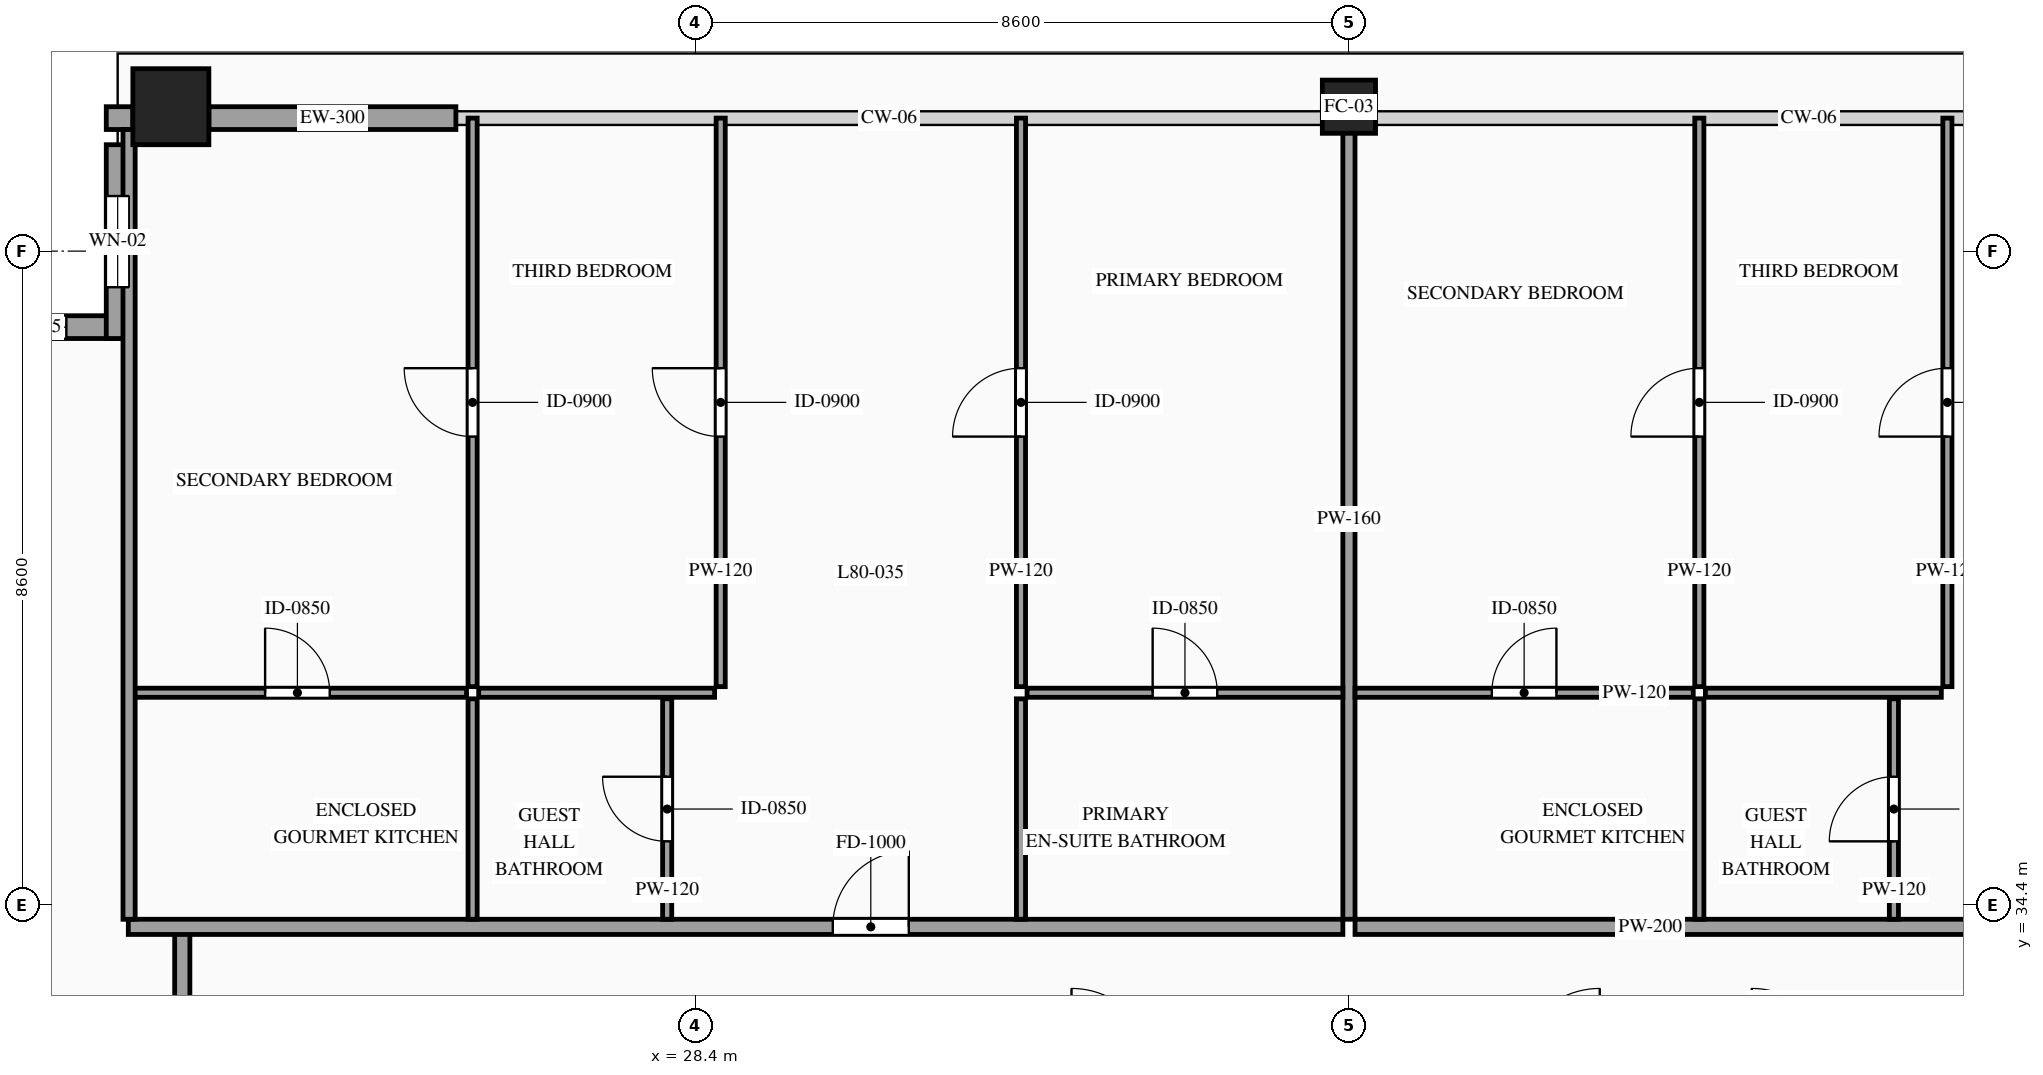
"""IFC4 building model, lengths in metres.
Left out: names, types, materials, properties, quantities, classifications, styles, units other than length and angle.
Written with IfcOpenShell. Run it as: python <this file> out.ifc"""

import sys

from ifc_helpers import new_model, si_unit, direction, frame, frame_2d, origin, origin_2d, place, context, subcontext, project, spatial, rectangle, hollow_rectangle, extrude, source, transform, mapped, element, fill, save


model = new_model("IFC4")
c1 = context("Model", 3, precision=1e-05, world=origin(), true_north=direction((0.0, 1.0)))
c2 = subcontext(c1, "Body", "Model", "MODEL_VIEW")
j1 = project(units=[si_unit("LENGTHUNIT", "METRE"), si_unit("PLANEANGLEUNIT", "RADIAN")], contexts=[c1])
p1 = place(None, origin())
s1 = spatial("IfcSite", under=j1, at=p1, CompositionType="ELEMENT")
p2 = place(p1, origin())
s2 = spatial("IfcBuilding", under=s1, at=p2, CompositionType="ELEMENT")
p3 = place(p2, frame((0.0, 0.0, 299.6)))
s3 = spatial("IfcBuildingStorey", under=s2, at=p3, CompositionType="ELEMENT", Elevation=299.6)
m1 = source(origin(), c2, "Body", "SweptSolid", [
    extrude(hollow_rectangle(XDim=1.0, YDim=1.0, WallThickness=0.048, at=origin_2d()), origin(), (0.0, 0.0, 1.0), 3.5),
])
p4 = place(p3, frame((21.5, 44.9, 0.0), z_axis=(0.0, 0.0, 1.0), x_axis=(1.0, 0.0, 0.0)))
e1 = element("IfcColumn", 1, at=p4, inside=s3, PredefinedType="COLUMN", context=c2, shape_type="MappedRepresentation", body=[
    mapped(m1, transform((0.0, 0.0, 0.0), scale=1.0)),
])
m2 = source(origin(), c2, "Body", "SweptSolid", [
    extrude(hollow_rectangle(XDim=0.7, YDim=0.7, WallThickness=0.032, at=origin_2d()), origin(), (0.0, 0.0, 1.0), 3.5),
])
p5 = place(p3, frame((37.0, 44.9, 0.0), z_axis=(0.0, 0.0, 1.0), x_axis=(1.0, 0.0, 0.0)))
e2 = element("IfcColumn", 2, at=p5, inside=s3, PredefinedType="COLUMN", context=c2, shape_type="MappedRepresentation", body=[
    mapped(m2, transform((0.0, 0.0, 0.0), scale=1.0)),
])
p6 = place(p3, frame((20.95, 42.0, 0.0), z_axis=(0.0, 0.0, 1.0), x_axis=(-1.0, 0.0, 0.0)))
e3 = element("IfcWall", 3, at=p6, inside=s3, PredefinedType="SOLIDWALL", context=c2, shape_type="SweptSolid", body=[
    extrude(rectangle(XDim=2.55, YDim=0.3, at=frame_2d((1.275, 0.0))), origin(), (0.0, 0.0, 1.0), 3.28),
])
p7 = place(p6, frame((0.825, 0.0, 0.85)))
e4 = element("IfcOpeningElement", 4, at=p7, cuts=e3, PredefinedType="OPENING", context=c2, shape_type="SweptSolid", body=[
    extrude(rectangle(XDim=0.9, YDim=1.5, at=frame_2d((0.45, 0.75))), frame((0.0, 0.165, 0.0), z_axis=(0.0, -1.0, 0.0), x_axis=(1.0, 0.0, 0.0)), (0.0, 0.0, 1.0), 0.33),
])
p8 = place(p3, frame((20.8, 44.4, 0.0), z_axis=(0.0, 0.0, 1.0), x_axis=(0.0, -1.0, 0.0)))
e5 = element("IfcWall", 5, at=p8, inside=s3, PredefinedType="SOLIDWALL", context=c2, shape_type="SweptSolid", body=[
    extrude(rectangle(XDim=2.55, YDim=0.3, at=frame_2d((1.275, 0.0))), origin(), (0.0, 0.0, 1.0), 3.28),
])
p9 = place(p8, frame((0.675, 0.0, 0.85)))
e6 = element("IfcOpeningElement", 6, at=p9, cuts=e5, PredefinedType="OPENING", context=c2, shape_type="SweptSolid", body=[
    extrude(rectangle(XDim=1.2, YDim=2.1, at=frame_2d((0.6, 1.05))), frame((0.0, 0.165, 0.0), z_axis=(0.0, -1.0, 0.0), x_axis=(1.0, 0.0, 0.0)), (0.0, 0.0, 1.0), 0.33),
])
m3 = source(origin(), c2, "Body", "SweptSolid", [
    extrude(rectangle(XDim=0.35, YDim=0.3, at=frame_2d((0.175, 0.0))), origin(), (0.0, 0.0, 1.0), 3.28),
])
p10 = place(p3, frame((20.65, 44.75, 0.0), z_axis=(0.0, 0.0, 1.0), x_axis=(1.0, 0.0, 0.0)))
e7 = element("IfcWall", 7, at=p10, inside=s3, PredefinedType="SOLIDWALL", context=c2, shape_type="MappedRepresentation", body=[
    mapped(m3, transform((0.0, 0.0, 0.0), scale=1.0)),
])
m4 = source(origin(), c2, "Body", "SweptSolid", [
    extrude(rectangle(XDim=3.25, YDim=0.3, at=frame_2d((1.625, 0.0))), origin(), (0.0, 0.0, 1.0), 2.885),
])
p11 = place(p3, frame((22.0, 44.75, 0.0), z_axis=(0.0, 0.0, 1.0), x_axis=(1.0, 0.0, 0.0)))
e8 = element("IfcWall", 8, at=p11, inside=s3, PredefinedType="SOLIDWALL", context=c2, shape_type="MappedRepresentation", body=[
    mapped(m4, transform((0.0, 0.0, 0.0), scale=1.0)),
])
m5 = source(origin(), c2, "Body", "SweptSolid", [
    extrude(rectangle(XDim=1.7, YDim=0.2, at=frame_2d((0.85, 0.0))), origin(), (0.0, 0.0, 1.0), 3.28),
])
p12 = place(p3, frame((21.65, 32.35, 0.0), z_axis=(0.0, 0.0, 1.0), x_axis=(0.0, 1.0, 0.0)))
e9 = element("IfcWall", 9, at=p12, inside=s3, PredefinedType="PARTITIONING", context=c2, shape_type="MappedRepresentation", body=[
    mapped(m5, transform((0.0, 0.0, 0.0), scale=1.0)),
])
p13 = place(p3, frame((20.94, 34.11, 0.0), z_axis=(0.0, 0.0, 1.0), x_axis=(1.0, 0.0, 0.0)))
e10 = element("IfcWall", 10, at=p13, inside=s3, PredefinedType="PARTITIONING", context=c2, shape_type="SweptSolid", body=[
    extrude(rectangle(XDim=15.98, YDim=0.2, at=frame_2d((7.99, 0.0))), origin(), (0.0, 0.0, 1.0), 3.28),
])
p14 = place(p13, frame((9.269, 0.0, 0.0)))
e11 = element("IfcOpeningElement", 11, at=p14, cuts=e10, PredefinedType="OPENING", context=c2, shape_type="SweptSolid", body=[
    extrude(rectangle(XDim=1.0, YDim=2.2, at=frame_2d((0.5, 1.1))), frame((0.0, 0.115, 0.0), z_axis=(0.0, -1.0, 0.0), x_axis=(1.0, 0.0, 0.0)), (0.0, 0.0, 1.0), 0.23),
])
m6 = source(origin(), c2, "Body", "SweptSolid", [
    extrude(rectangle(XDim=10.54, YDim=0.16, at=frame_2d((5.27, 0.0))), origin(), (0.0, 0.0, 1.0), 2.787),
])
p15 = place(p3, frame((37.0, 34.21, 0.0), z_axis=(0.0, 0.0, 1.0), x_axis=(0.0, 1.0, 0.0)))
e12 = element("IfcWall", 12, at=p15, inside=s3, PredefinedType="PARTITIONING", context=c2, shape_type="MappedRepresentation", body=[
    mapped(m6, transform((0.0, 0.0, 0.0), scale=1.0)),
])
p16 = place(p3, frame((20.94, 37.19, 0.0), z_axis=(0.0, 0.0, 1.0), x_axis=(1.0, 0.0, 0.0)))
e13 = element("IfcWall", 13, at=p16, inside=s3, PredefinedType="PARTITIONING", context=c2, shape_type="SweptSolid", body=[
    extrude(rectangle(XDim=4.45, YDim=0.12, at=frame_2d((2.225, 0.0))), origin(), (0.0, 0.0, 1.0), 3.28),
])
p17 = place(p16, frame((1.8, 0.0, 0.0)))
e14 = element("IfcOpeningElement", 14, at=p17, cuts=e13, PredefinedType="OPENING", context=c2, shape_type="SweptSolid", body=[
    extrude(rectangle(XDim=0.85, YDim=2.1, at=frame_2d((0.425, 1.05))), frame((0.0, 0.075, 0.0), z_axis=(0.0, -1.0, 0.0), x_axis=(1.0, 0.0, 0.0)), (0.0, 0.0, 1.0), 0.15),
])
m7 = source(origin(), c2, "Body", "SweptSolid", [
    extrude(rectangle(XDim=2.9, YDim=0.12, at=frame_2d((1.45, 0.0))), origin(), (0.0, 0.0, 1.0), 3.28),
])
p18 = place(p3, frame((25.47, 34.21, 0.0), z_axis=(0.0, 0.0, 1.0), x_axis=(0.0, 1.0, 0.0)))
e15 = element("IfcWall", 15, at=p18, inside=s3, PredefinedType="PARTITIONING", context=c2, shape_type="MappedRepresentation", body=[
    mapped(m7, transform((0.0, 0.0, 0.0), scale=1.0)),
])
p19 = place(p3, frame((28.03, 34.21, 0.0), z_axis=(0.0, 0.0, 1.0), x_axis=(0.0, 1.0, 0.0)))
e16 = element("IfcWall", 16, at=p19, inside=s3, PredefinedType="PARTITIONING", context=c2, shape_type="SweptSolid", body=[
    extrude(rectangle(XDim=2.9, YDim=0.12, at=frame_2d((1.45, 0.0))), origin(), (0.0, 0.0, 1.0), 3.28),
])
p20 = place(p19, frame((1.025, 0.0, 0.0)))
e17 = element("IfcOpeningElement", 17, at=p20, cuts=e16, PredefinedType="OPENING", context=c2, shape_type="SweptSolid", body=[
    extrude(rectangle(XDim=0.85, YDim=2.1, at=frame_2d((0.425, 1.05))), frame((0.0, 0.075, 0.0), z_axis=(0.0, -1.0, 0.0), x_axis=(1.0, 0.0, 0.0)), (0.0, 0.0, 1.0), 0.15),
])
p21 = place(p3, frame((32.765, 37.19, 0.0), z_axis=(0.0, 0.0, 1.0), x_axis=(1.0, 0.0, 0.0)))
e18 = element("IfcWall", 18, at=p21, inside=s3, PredefinedType="PARTITIONING", context=c2, shape_type="SweptSolid", body=[
    extrude(rectangle(XDim=4.155, YDim=0.12, at=frame_2d((2.078, 0.0))), origin(), (0.0, 0.0, 1.0), 3.28),
])
p22 = place(p21, frame((1.653, 0.0, 0.0)))
e19 = element("IfcOpeningElement", 19, at=p22, cuts=e18, PredefinedType="OPENING", context=c2, shape_type="SweptSolid", body=[
    extrude(rectangle(XDim=0.85, YDim=2.1, at=frame_2d((0.425, 1.05))), frame((0.0, 0.075, 0.0), z_axis=(0.0, -1.0, 0.0), x_axis=(1.0, 0.0, 0.0)), (0.0, 0.0, 1.0), 0.15),
])
p23 = place(p3, frame((32.685, 34.21, 0.0), z_axis=(0.0, 0.0, 1.0), x_axis=(0.0, 1.0, 0.0)))
e20 = element("IfcWall", 20, at=p23, inside=s3, PredefinedType="PARTITIONING", context=c2, shape_type="MappedRepresentation", body=[
    mapped(m7, transform((0.0, 0.0, 0.0), scale=1.0)),
])
p24 = place(p3, frame((25.47, 37.27, 0.0), z_axis=(0.0, 0.0, 1.0), x_axis=(0.0, 1.0, 0.0)))
e21 = element("IfcWall", 21, at=p24, inside=s3, PredefinedType="PARTITIONING", context=c2, shape_type="SweptSolid", body=[
    extrude(rectangle(XDim=7.48, YDim=0.12, at=frame_2d((3.74, 0.0))), origin(), (0.0, 0.0, 1.0), 3.28),
])
p25 = place(p24, frame((3.29, 0.0, 0.0)))
e22 = element("IfcOpeningElement", 22, at=p25, cuts=e21, PredefinedType="OPENING", context=c2, shape_type="SweptSolid", body=[
    extrude(rectangle(XDim=0.9, YDim=2.15, at=frame_2d((0.45, 1.075))), frame((0.0, 0.075, 0.0), z_axis=(0.0, -1.0, 0.0), x_axis=(1.0, 0.0, 0.0)), (0.0, 0.0, 1.0), 0.15),
])
p26 = place(p3, frame((32.685, 37.27, 0.0), z_axis=(0.0, 0.0, 1.0), x_axis=(0.0, 1.0, 0.0)))
e23 = element("IfcWall", 23, at=p26, inside=s3, PredefinedType="PARTITIONING", context=c2, shape_type="SweptSolid", body=[
    extrude(rectangle(XDim=7.48, YDim=0.12, at=frame_2d((3.74, 0.0))), origin(), (0.0, 0.0, 1.0), 3.28),
])
p27 = place(p26, frame((3.29, 0.0, 0.0)))
e24 = element("IfcOpeningElement", 24, at=p27, cuts=e23, PredefinedType="OPENING", context=c2, shape_type="SweptSolid", body=[
    extrude(rectangle(XDim=0.9, YDim=2.15, at=frame_2d((0.45, 1.075))), frame((0.0, 0.075, 0.0), z_axis=(0.0, -1.0, 0.0), x_axis=(1.0, 0.0, 0.0)), (0.0, 0.0, 1.0), 0.15),
])
m8 = source(origin(), c2, "Body", "SweptSolid", [
    extrude(rectangle(XDim=3.104, YDim=0.12, at=frame_2d((1.552, 0.0))), origin(), (0.0, 0.0, 1.0), 3.28),
])
p28 = place(p3, frame((25.55, 37.19, 0.0), z_axis=(0.0, 0.0, 1.0), x_axis=(1.0, 0.0, 0.0)))
e25 = element("IfcWall", 25, at=p28, inside=s3, PredefinedType="PARTITIONING", context=c2, shape_type="MappedRepresentation", body=[
    mapped(m8, transform((0.0, 0.0, 0.0), scale=1.0)),
])
p29 = place(p3, frame((28.734, 37.27, 0.0), z_axis=(0.0, 0.0, 1.0), x_axis=(0.0, 1.0, 0.0)))
e26 = element("IfcWall", 26, at=p29, inside=s3, PredefinedType="PARTITIONING", context=c2, shape_type="SweptSolid", body=[
    extrude(rectangle(XDim=7.48, YDim=0.12, at=frame_2d((3.74, 0.0))), origin(), (0.0, 0.0, 1.0), 3.28),
])
p30 = place(p29, frame((3.29, 0.0, 0.0)))
e27 = element("IfcOpeningElement", 27, at=p30, cuts=e26, PredefinedType="OPENING", context=c2, shape_type="SweptSolid", body=[
    extrude(rectangle(XDim=0.9, YDim=2.15, at=frame_2d((0.45, 1.075))), frame((0.0, 0.075, 0.0), z_axis=(0.0, -1.0, 0.0), x_axis=(1.0, 0.0, 0.0)), (0.0, 0.0, 1.0), 0.15),
])
p31 = place(p3, frame((37.08, 34.11, 0.0), z_axis=(0.0, 0.0, 1.0), x_axis=(1.0, 0.0, 0.0)))
e28 = element("IfcWall", 28, at=p31, inside=s3, PredefinedType="PARTITIONING", context=c2, shape_type="SweptSolid", body=[
    extrude(rectangle(XDim=15.98, YDim=0.2, at=frame_2d((7.99, 0.0))), origin(), (0.0, 0.0, 1.0), 3.28),
])
p32 = place(p31, frame((8.022, 0.0, 0.0)))
e29 = element("IfcOpeningElement", 29, at=p32, cuts=e28, PredefinedType="OPENING", context=c2, shape_type="SweptSolid", body=[
    extrude(rectangle(XDim=1.0, YDim=2.2, at=frame_2d((0.5, 1.1))), frame((0.0, 0.115, 0.0), z_axis=(0.0, -1.0, 0.0), x_axis=(1.0, 0.0, 0.0)), (0.0, 0.0, 1.0), 0.23),
])
m9 = source(origin(), c2, "Body", "SweptSolid", [
    extrude(rectangle(XDim=10.39, YDim=0.16, at=frame_2d((5.195, 0.0))), origin(), (0.0, 0.0, 1.0), 3.28),
])
p33 = place(p3, frame((20.95, 34.21, 0.0), z_axis=(0.0, 0.0, 1.0), x_axis=(0.0, 1.0, 0.0)))
e30 = element("IfcWall", 30, at=p33, inside=s3, PredefinedType="PARTITIONING", context=c2, shape_type="MappedRepresentation", body=[
    mapped(m9, transform((0.0, 0.0, 0.0), scale=1.0)),
])
p34 = place(p3, frame((37.08, 37.19, 0.0), z_axis=(0.0, 0.0, 1.0), x_axis=(1.0, 0.0, 0.0)))
e31 = element("IfcWall", 31, at=p34, inside=s3, PredefinedType="PARTITIONING", context=c2, shape_type="SweptSolid", body=[
    extrude(rectangle(XDim=4.45, YDim=0.12, at=frame_2d((2.225, 0.0))), origin(), (0.0, 0.0, 1.0), 3.28),
])
p35 = place(p34, frame((1.8, 0.0, 0.0)))
e32 = element("IfcOpeningElement", 32, at=p35, cuts=e31, PredefinedType="OPENING", context=c2, shape_type="SweptSolid", body=[
    extrude(rectangle(XDim=0.85, YDim=2.1, at=frame_2d((0.425, 1.05))), frame((0.0, 0.075, 0.0), z_axis=(0.0, -1.0, 0.0), x_axis=(1.0, 0.0, 0.0)), (0.0, 0.0, 1.0), 0.15),
])
p36 = place(p3, frame((41.61, 34.21, 0.0), z_axis=(0.0, 0.0, 1.0), x_axis=(0.0, 1.0, 0.0)))
e33 = element("IfcWall", 33, at=p36, inside=s3, PredefinedType="PARTITIONING", context=c2, shape_type="MappedRepresentation", body=[
    mapped(m7, transform((0.0, 0.0, 0.0), scale=1.0)),
])
p37 = place(p3, frame((44.17, 34.21, 0.0), z_axis=(0.0, 0.0, 1.0), x_axis=(0.0, 1.0, 0.0)))
e34 = element("IfcWall", 34, at=p37, inside=s3, PredefinedType="PARTITIONING", context=c2, shape_type="SweptSolid", body=[
    extrude(rectangle(XDim=2.9, YDim=0.12, at=frame_2d((1.45, 0.0))), origin(), (0.0, 0.0, 1.0), 3.28),
])
p38 = place(p37, frame((1.025, 0.0, 0.0)))
e35 = element("IfcOpeningElement", 35, at=p38, cuts=e34, PredefinedType="OPENING", context=c2, shape_type="SweptSolid", body=[
    extrude(rectangle(XDim=0.85, YDim=2.1, at=frame_2d((0.425, 1.05))), frame((0.0, 0.075, 0.0), z_axis=(0.0, -1.0, 0.0), x_axis=(1.0, 0.0, 0.0)), (0.0, 0.0, 1.0), 0.15),
])
p39 = place(p3, frame((41.61, 37.27, 0.0), z_axis=(0.0, 0.0, 1.0), x_axis=(0.0, 1.0, 0.0)))
e36 = element("IfcWall", 36, at=p39, inside=s3, PredefinedType="PARTITIONING", context=c2, shape_type="SweptSolid", body=[
    extrude(rectangle(XDim=7.48, YDim=0.12, at=frame_2d((3.74, 0.0))), origin(), (0.0, 0.0, 1.0), 3.28),
])
p40 = place(p39, frame((3.29, 0.0, 0.0)))
e37 = element("IfcOpeningElement", 37, at=p40, cuts=e36, PredefinedType="OPENING", context=c2, shape_type="SweptSolid", body=[
    extrude(rectangle(XDim=0.9, YDim=2.15, at=frame_2d((0.45, 1.075))), frame((0.0, 0.075, 0.0), z_axis=(0.0, -1.0, 0.0), x_axis=(1.0, 0.0, 0.0)), (0.0, 0.0, 1.0), 0.15),
])
p41 = place(p3, frame((41.69, 37.19, 0.0), z_axis=(0.0, 0.0, 1.0), x_axis=(1.0, 0.0, 0.0)))
e38 = element("IfcWall", 38, at=p41, inside=s3, PredefinedType="PARTITIONING", context=c2, shape_type="MappedRepresentation", body=[
    mapped(m8, transform((0.0, 0.0, 0.0), scale=1.0)),
])
p42 = place(p3, frame((44.874, 37.27, 0.0), z_axis=(0.0, 0.0, 1.0), x_axis=(0.0, 1.0, 0.0)))
e39 = element("IfcWall", 39, at=p42, inside=s3, PredefinedType="PARTITIONING", context=c2, shape_type="SweptSolid", body=[
    extrude(rectangle(XDim=7.48, YDim=0.12, at=frame_2d((3.74, 0.0))), origin(), (0.0, 0.0, 1.0), 3.28),
])
p43 = place(p42, frame((3.29, 0.0, 0.0)))
e40 = element("IfcOpeningElement", 40, at=p43, cuts=e39, PredefinedType="OPENING", context=c2, shape_type="SweptSolid", body=[
    extrude(rectangle(XDim=0.9, YDim=2.15, at=frame_2d((0.45, 1.075))), frame((0.0, 0.075, 0.0), z_axis=(0.0, -1.0, 0.0), x_axis=(1.0, 0.0, 0.0)), (0.0, 0.0, 1.0), 0.15),
])
m10 = source(origin(), c2, "Body", "SweptSolid", [
    extrude(rectangle(XDim=0.9, YDim=1.5, at=frame_2d((0.45, 0.75))), frame((0.0, 0.03, 0.0), z_axis=(0.0, -1.0, 0.0), x_axis=(1.0, 0.0, 0.0)), (0.0, 0.0, 1.0), 0.06),
])
p44 = place(p7, origin())
e41 = element("IfcWindow", 41, at=p44, inside=s3, PartitioningType="SINGLE_PANEL", PredefinedType="WINDOW", context=c2, shape_type="MappedRepresentation", body=[
    mapped(m10, transform((0.0, 0.0, 0.0), scale=1.0)),
])
fill(e4, e41)
m11 = source(origin(), c2, "Body", "SweptSolid", [
    extrude(rectangle(XDim=1.2, YDim=2.1, at=frame_2d((0.6, 1.05))), frame((0.0, 0.03, 0.0), z_axis=(0.0, -1.0, 0.0), x_axis=(1.0, 0.0, 0.0)), (0.0, 0.0, 1.0), 0.06),
])
p45 = place(p9, origin())
e42 = element("IfcWindow", 42, at=p45, inside=s3, PartitioningType="SINGLE_PANEL", PredefinedType="WINDOW", context=c2, shape_type="MappedRepresentation", body=[
    mapped(m11, transform((0.0, 0.0, 0.0), scale=1.0)),
])
fill(e6, e42)
m12 = source(origin(), c2, "Body", "SweptSolid", [
    extrude(rectangle(XDim=1.0, YDim=2.2, at=frame_2d((0.5, 1.1))), frame((0.0, 0.025, 0.0), z_axis=(0.0, -1.0, 0.0), x_axis=(1.0, 0.0, 0.0)), (0.0, 0.0, 1.0), 0.05),
])
p46 = place(p14, origin())
e43 = element("IfcDoor", 43, at=p46, inside=s3, OperationType="SINGLE_SWING_RIGHT", PredefinedType="DOOR", context=c2, shape_type="MappedRepresentation", body=[
    mapped(m12, transform((0.0, 0.0, 0.0), scale=1.0)),
])
fill(e11, e43)
m13 = source(origin(), c2, "Body", "SweptSolid", [
    extrude(rectangle(XDim=0.85, YDim=2.1, at=frame_2d((0.425, 1.05))), frame((0.0, 0.025, 0.0), z_axis=(0.0, -1.0, 0.0), x_axis=(1.0, 0.0, 0.0)), (0.0, 0.0, 1.0), 0.05),
])
p47 = place(p17, origin())
e44 = element("IfcDoor", 44, at=p47, inside=s3, OperationType="SINGLE_SWING_LEFT", PredefinedType="DOOR", context=c2, shape_type="MappedRepresentation", body=[
    mapped(m13, transform((0.0, 0.0, 0.0), scale=1.0)),
])
fill(e14, e44)
p48 = place(p20, origin())
e45 = element("IfcDoor", 45, at=p48, inside=s3, OperationType="SINGLE_SWING_RIGHT", PredefinedType="DOOR", context=c2, shape_type="MappedRepresentation", body=[
    mapped(m13, transform((0.0, 0.0, 0.0), scale=1.0)),
])
fill(e17, e45)
p49 = place(p22, origin())
e46 = element("IfcDoor", 46, at=p49, inside=s3, OperationType="SINGLE_SWING_LEFT", PredefinedType="DOOR", context=c2, shape_type="MappedRepresentation", body=[
    mapped(m13, transform((0.0, 0.0, 0.0), scale=1.0)),
])
fill(e19, e46)
m14 = source(origin(), c2, "Body", "SweptSolid", [
    extrude(rectangle(XDim=0.9, YDim=2.15, at=frame_2d((0.45, 1.075))), frame((0.0, 0.025, 0.0), z_axis=(0.0, -1.0, 0.0), x_axis=(1.0, 0.0, 0.0)), (0.0, 0.0, 1.0), 0.05),
])
p50 = place(p25, origin())
e47 = element("IfcDoor", 47, at=p50, inside=s3, OperationType="SINGLE_SWING_RIGHT", PredefinedType="DOOR", context=c2, shape_type="MappedRepresentation", body=[
    mapped(m14, transform((0.0, 0.0, 0.0), scale=1.0)),
])
fill(e22, e47)
p51 = place(p27, origin())
e48 = element("IfcDoor", 48, at=p51, inside=s3, OperationType="SINGLE_SWING_LEFT", PredefinedType="DOOR", context=c2, shape_type="MappedRepresentation", body=[
    mapped(m14, transform((0.0, 0.0, 0.0), scale=1.0)),
])
fill(e24, e48)
p52 = place(p30, origin())
e49 = element("IfcDoor", 49, at=p52, inside=s3, OperationType="SINGLE_SWING_RIGHT", PredefinedType="DOOR", context=c2, shape_type="MappedRepresentation", body=[
    mapped(m14, transform((0.0, 0.0, 0.0), scale=1.0)),
])
fill(e27, e49)
p53 = place(p35, origin())
e50 = element("IfcDoor", 50, at=p53, inside=s3, OperationType="SINGLE_SWING_RIGHT", PredefinedType="DOOR", context=c2, shape_type="MappedRepresentation", body=[
    mapped(m13, transform((0.0, 0.0, 0.0), scale=1.0)),
])
fill(e32, e50)
p54 = place(p38, origin())
e51 = element("IfcDoor", 51, at=p54, inside=s3, OperationType="SINGLE_SWING_LEFT", PredefinedType="DOOR", context=c2, shape_type="MappedRepresentation", body=[
    mapped(m13, transform((0.0, 0.0, 0.0), scale=1.0)),
])
fill(e35, e51)
p55 = place(p40, origin())
e52 = element("IfcDoor", 52, at=p55, inside=s3, OperationType="SINGLE_SWING_LEFT", PredefinedType="DOOR", context=c2, shape_type="MappedRepresentation", body=[
    mapped(m14, transform((0.0, 0.0, 0.0), scale=1.0)),
])
fill(e37, e52)
p56 = place(p43, origin())
e53 = element("IfcDoor", 53, at=p56, inside=s3, OperationType="SINGLE_SWING_LEFT", PredefinedType="DOOR", context=c2, shape_type="MappedRepresentation", body=[
    mapped(m14, transform((0.0, 0.0, 0.0), scale=1.0)),
])
fill(e40, e53)
save(model, sys.argv[1])
